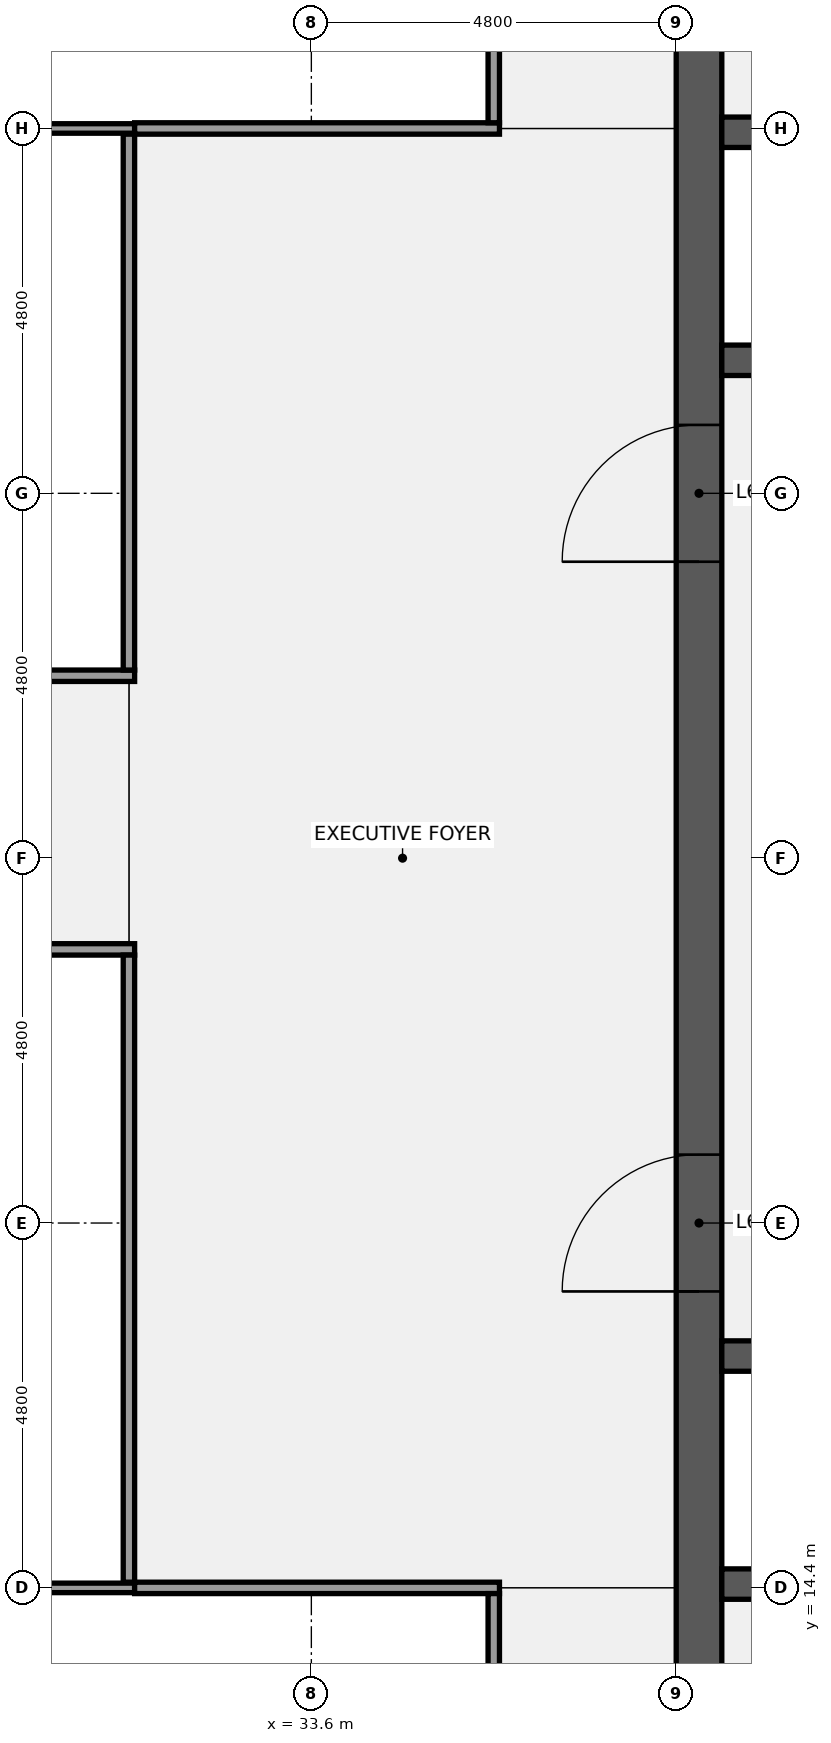
"""IFC4 building model, lengths in metres.
Left out: names, types, materials, properties, quantities, classifications, styles, units other than length and angle.
Written with IfcOpenShell. Run it as: python <this file> out.ifc"""

import sys

from ifc_helpers import new_model, si_unit, direction, frame, frame_2d, origin, place, context, subcontext, project, spatial, rectangle, extrude, element, fill, save


model = new_model("IFC4")
c1 = context("Model", 3, precision=1e-05, world=origin(), true_north=direction((0.0, 1.0)))
c2 = subcontext(c1, "Body", "Model", "MODEL_VIEW")
j1 = project(units=[si_unit("LENGTHUNIT", "METRE"), si_unit("PLANEANGLEUNIT", "RADIAN")], contexts=[c1])
p1 = place(None, origin())
s1 = spatial("IfcSite", under=j1, at=p1, CompositionType="ELEMENT")
p2 = place(p1, origin())
s2 = spatial("IfcBuilding", under=s1, at=p2, CompositionType="ELEMENT")
p3 = place(p2, frame((0.0, 0.0, 298.3)))
s3 = spatial("IfcBuildingStorey", under=s2, at=p3, CompositionType="ELEMENT", Elevation=298.3)
p4 = place(p3, frame((38.7, 9.6, 0.0), z_axis=(0.0, 0.0, 1.0), x_axis=(0.0, 1.0, 0.0)))
e1 = element("IfcWall", 1, at=p4, inside=s3, PredefinedType="SHEAR", context=c2, shape_type="SweptSolid", body=[
    extrude(rectangle(XDim=28.8, YDim=0.6, at=frame_2d((14.4, 0.0))), origin(), (0.0, 0.0, 1.0), 3.84),
])
p5 = place(p4, frame((8.7, 0.0, 0.0)))
e2 = element("IfcOpeningElement", 2, at=p5, cuts=e1, PredefinedType="OPENING", context=c2, shape_type="SweptSolid", body=[
    extrude(rectangle(XDim=1.8, YDim=2.1, at=frame_2d((0.9, 1.05))), frame((0.0, 0.31, 0.0), z_axis=(0.0, -1.0, 0.0), x_axis=(1.0, 0.0, 0.0)), (0.0, 0.0, 1.0), 0.62),
])
p6 = place(p4, frame((18.3, 0.0, 0.0)))
e3 = element("IfcOpeningElement", 3, at=p6, cuts=e1, PredefinedType="OPENING", context=c2, shape_type="SweptSolid", body=[
    extrude(rectangle(XDim=1.8, YDim=2.1, at=frame_2d((0.9, 1.05))), frame((0.0, 0.31, 0.0), z_axis=(0.0, -1.0, 0.0), x_axis=(1.0, 0.0, 0.0)), (0.0, 0.0, 1.0), 0.62),
])
p7 = place(p3, frame((39.0, 14.45, 0.0), z_axis=(0.0, 0.0, 1.0), x_axis=(1.0, 0.0, 0.0)))
e4 = element("IfcWall", 4, at=p7, inside=s3, PredefinedType="SHEAR", context=c2, shape_type="SweptSolid", body=[
    extrude(rectangle(XDim=18.0, YDim=0.4, at=frame_2d((9.0, 0.0))), origin(), (0.0, 0.0, 1.0), 3.84),
])
p8 = place(p3, frame((39.0, 17.45, 0.0), z_axis=(0.0, 0.0, 1.0), x_axis=(1.0, 0.0, 0.0)))
e5 = element("IfcWall", 5, at=p8, inside=s3, PredefinedType="SHEAR", context=c2, shape_type="SweptSolid", body=[
    extrude(rectangle(XDim=18.0, YDim=0.4, at=frame_2d((9.0, 0.0))), origin(), (0.0, 0.0, 1.0), 3.84),
])
p9 = place(p8, frame((15.738, 0.0, 0.0)))
e6 = element("IfcOpeningElement", 6, at=p9, cuts=e5, PredefinedType="OPENING", context=c2, shape_type="SweptSolid", body=[
    extrude(rectangle(XDim=1.0, YDim=2.1, at=frame_2d((0.5, 1.05))), frame((0.0, 0.21, 0.0), z_axis=(0.0, -1.0, 0.0), x_axis=(1.0, 0.0, 0.0)), (0.0, 0.0, 1.0), 0.42),
])
p10 = place(p8, frame((9.7, 0.0, 0.0)))
e7 = element("IfcOpeningElement", 7, at=p10, cuts=e5, PredefinedType="OPENING", context=c2, shape_type="SweptSolid", body=[
    extrude(rectangle(XDim=1.0, YDim=2.1, at=frame_2d((0.5, 1.05))), frame((0.0, 0.21, 0.0), z_axis=(0.0, -1.0, 0.0), x_axis=(1.0, 0.0, 0.0)), (0.0, 0.0, 1.0), 0.42),
])
p11 = place(p8, frame((2.462, 0.0, 0.0)))
e8 = element("IfcOpeningElement", 8, at=p11, cuts=e5, PredefinedType="OPENING", context=c2, shape_type="SweptSolid", body=[
    extrude(rectangle(XDim=1.0, YDim=2.1, at=frame_2d((0.5, 1.05))), frame((0.0, 0.21, 0.0), z_axis=(0.0, -1.0, 0.0), x_axis=(1.0, 0.0, 0.0)), (0.0, 0.0, 1.0), 0.42),
])
p12 = place(p3, frame((39.0, 30.55, 0.0), z_axis=(0.0, 0.0, 1.0), x_axis=(1.0, 0.0, 0.0)))
e9 = element("IfcWall", 9, at=p12, inside=s3, PredefinedType="SHEAR", context=c2, shape_type="SweptSolid", body=[
    extrude(rectangle(XDim=18.0, YDim=0.4, at=frame_2d((9.0, 0.0))), origin(), (0.0, 0.0, 1.0), 3.84),
])
p13 = place(p12, frame((15.2, 0.0, 0.0)))
e10 = element("IfcOpeningElement", 10, at=p13, cuts=e9, PredefinedType="OPENING", context=c2, shape_type="SweptSolid", body=[
    extrude(rectangle(XDim=1.2, YDim=2.1, at=frame_2d((0.6, 1.05))), frame((0.0, 0.21, 0.0), z_axis=(0.0, -1.0, 0.0), x_axis=(1.0, 0.0, 0.0)), (0.0, 0.0, 1.0), 0.42),
])
p14 = place(p12, frame((12.6, 0.0, 0.0)))
e11 = element("IfcOpeningElement", 11, at=p14, cuts=e9, PredefinedType="OPENING", context=c2, shape_type="SweptSolid", body=[
    extrude(rectangle(XDim=1.2, YDim=2.1, at=frame_2d((0.6, 1.05))), frame((0.0, 0.21, 0.0), z_axis=(0.0, -1.0, 0.0), x_axis=(1.0, 0.0, 0.0)), (0.0, 0.0, 1.0), 0.42),
])
p15 = place(p12, frame((10.0, 0.0, 0.0)))
e12 = element("IfcOpeningElement", 12, at=p15, cuts=e9, PredefinedType="OPENING", context=c2, shape_type="SweptSolid", body=[
    extrude(rectangle(XDim=1.2, YDim=2.1, at=frame_2d((0.6, 1.05))), frame((0.0, 0.21, 0.0), z_axis=(0.0, -1.0, 0.0), x_axis=(1.0, 0.0, 0.0)), (0.0, 0.0, 1.0), 0.42),
])
p16 = place(p12, frame((6.8, 0.0, 0.0)))
e13 = element("IfcOpeningElement", 13, at=p16, cuts=e9, PredefinedType="OPENING", context=c2, shape_type="SweptSolid", body=[
    extrude(rectangle(XDim=1.2, YDim=2.1, at=frame_2d((0.6, 1.05))), frame((0.0, 0.21, 0.0), z_axis=(0.0, -1.0, 0.0), x_axis=(1.0, 0.0, 0.0)), (0.0, 0.0, 1.0), 0.42),
])
p17 = place(p12, frame((4.2, 0.0, 0.0)))
e14 = element("IfcOpeningElement", 14, at=p17, cuts=e9, PredefinedType="OPENING", context=c2, shape_type="SweptSolid", body=[
    extrude(rectangle(XDim=1.2, YDim=2.1, at=frame_2d((0.6, 1.05))), frame((0.0, 0.21, 0.0), z_axis=(0.0, -1.0, 0.0), x_axis=(1.0, 0.0, 0.0)), (0.0, 0.0, 1.0), 0.42),
])
p18 = place(p12, frame((1.6, 0.0, 0.0)))
e15 = element("IfcOpeningElement", 15, at=p18, cuts=e9, PredefinedType="OPENING", context=c2, shape_type="SweptSolid", body=[
    extrude(rectangle(XDim=1.2, YDim=2.1, at=frame_2d((0.6, 1.05))), frame((0.0, 0.21, 0.0), z_axis=(0.0, -1.0, 0.0), x_axis=(1.0, 0.0, 0.0)), (0.0, 0.0, 1.0), 0.42),
])
p19 = place(p3, frame((39.0, 33.55, 0.0), z_axis=(0.0, 0.0, 1.0), x_axis=(1.0, 0.0, 0.0)))
e16 = element("IfcWall", 16, at=p19, inside=s3, PredefinedType="SHEAR", context=c2, shape_type="SweptSolid", body=[
    extrude(rectangle(XDim=18.0, YDim=0.4, at=frame_2d((9.0, 0.0))), origin(), (0.0, 0.0, 1.0), 3.84),
])
p20 = place(p3, frame((26.475, 14.4, 0.0), z_axis=(0.0, 0.0, 1.0), x_axis=(1.0, 0.0, 0.0)))
e17 = element("IfcWall", 17, at=p20, inside=s3, PredefinedType="PARTITIONING", context=c2, shape_type="SweptSolid", body=[
    extrude(rectangle(XDim=4.8, YDim=0.125, at=frame_2d((2.4, 0.0))), origin(), (0.0, 0.0, 1.0), 2.849),
])
p21 = place(p3, frame((31.275, 14.4, 0.0), z_axis=(0.0, 0.0, 1.0), x_axis=(1.0, 0.0, 0.0)))
e18 = element("IfcWall", 18, at=p21, inside=s3, PredefinedType="PARTITIONING", context=c2, shape_type="SweptSolid", body=[
    extrude(rectangle(XDim=4.8, YDim=0.15, at=frame_2d((2.4, 0.0))), origin(), (0.0, 0.0, 1.0), 2.849),
])
for number, where, z_axis, x_axis in (
    (19, (26.325, 22.8, 0.0), (0.0, 0.0, 1.0), (1.0, 0.0, 0.0)),
    (20, (26.325, 26.4, 0.0), (0.0, 0.0, 1.0), (1.0, 0.0, 0.0)),
):
    element("IfcWall", number, at=place(p3, frame(where, z_axis=z_axis, x_axis=x_axis)), inside=s3, PredefinedType="PARTITIONING", context=c2, shape_type="SweptSolid", body=[
        extrude(rectangle(XDim=4.95, YDim=0.15, at=frame_2d((2.475, 0.0))), origin(), (0.0, 0.0, 1.0), 2.849),
    ])
p22 = place(p3, frame((26.475, 33.6, 0.0), z_axis=(0.0, 0.0, 1.0), x_axis=(1.0, 0.0, 0.0)))
e21 = element("IfcWall", 21, at=p22, inside=s3, PredefinedType="PARTITIONING", context=c2, shape_type="SweptSolid", body=[
    extrude(rectangle(XDim=4.8, YDim=0.125, at=frame_2d((2.4, 0.0))), origin(), (0.0, 0.0, 1.0), 2.849),
])
p23 = place(p3, frame((31.275, 33.6, 0.0), z_axis=(0.0, 0.0, 1.0), x_axis=(1.0, 0.0, 0.0)))
e22 = element("IfcWall", 22, at=p23, inside=s3, PredefinedType="PARTITIONING", context=c2, shape_type="SweptSolid", body=[
    extrude(rectangle(XDim=4.8, YDim=0.15, at=frame_2d((2.4, 0.0))), origin(), (0.0, 0.0, 1.0), 2.849),
])
p24 = place(p3, frame((31.2, 14.475, 0.0), z_axis=(0.0, 0.0, 1.0), x_axis=(0.0, 1.0, 0.0)))
e23 = element("IfcWall", 23, at=p24, inside=s3, PredefinedType="PARTITIONING", context=c2, shape_type="SweptSolid", body=[
    extrude(rectangle(XDim=8.25, YDim=0.15, at=frame_2d((4.125, 0.0))), origin(), (0.0, 0.0, 1.0), 2.849),
])
p25 = place(p3, frame((31.2, 26.475, 0.0), z_axis=(0.0, 0.0, 1.0), x_axis=(0.0, 1.0, 0.0)))
e24 = element("IfcWall", 24, at=p25, inside=s3, PredefinedType="PARTITIONING", context=c2, shape_type="SweptSolid", body=[
    extrude(rectangle(XDim=7.05, YDim=0.15, at=frame_2d((3.525, 0.0))), origin(), (0.0, 0.0, 1.0), 2.849),
])
for number, where, z_axis, x_axis in (
    (25, (36.0, 9.675, 0.0), (0.0, 0.0, 1.0), (0.0, 1.0, 0.0)),
    (26, (36.0, 33.675, 0.0), (0.0, 0.0, 1.0), (0.0, 1.0, 0.0)),
):
    element("IfcWall", number, at=place(p3, frame(where, z_axis=z_axis, x_axis=x_axis)), inside=s3, PredefinedType="PARTITIONING", context=c2, shape_type="SweptSolid", body=[
        extrude(rectangle(XDim=4.65, YDim=0.15, at=frame_2d((2.325, 0.0))), origin(), (0.0, 0.0, 1.0), 2.849),
    ])
p26 = place(p5, origin())
e27 = element("IfcDoor", 27, at=p26, inside=s3, OperationType="DOUBLE_DOOR_SINGLE_SWING", PredefinedType="DOOR", context=c2, shape_type="SweptSolid", body=[
    extrude(rectangle(XDim=1.8, YDim=2.1, at=frame_2d((0.9, 1.05))), frame((0.0, 0.025, 0.0), z_axis=(0.0, -1.0, 0.0), x_axis=(1.0, 0.0, 0.0)), (0.0, 0.0, 1.0), 0.05),
])
fill(e2, e27)
p27 = place(p6, origin())
e28 = element("IfcDoor", 28, at=p27, inside=s3, OperationType="DOUBLE_DOOR_SINGLE_SWING", PredefinedType="DOOR", context=c2, shape_type="SweptSolid", body=[
    extrude(rectangle(XDim=1.8, YDim=2.1, at=frame_2d((0.9, 1.05))), frame((0.0, 0.025, 0.0), z_axis=(0.0, -1.0, 0.0), x_axis=(1.0, 0.0, 0.0)), (0.0, 0.0, 1.0), 0.05),
])
fill(e3, e28)
save(model, sys.argv[1])
